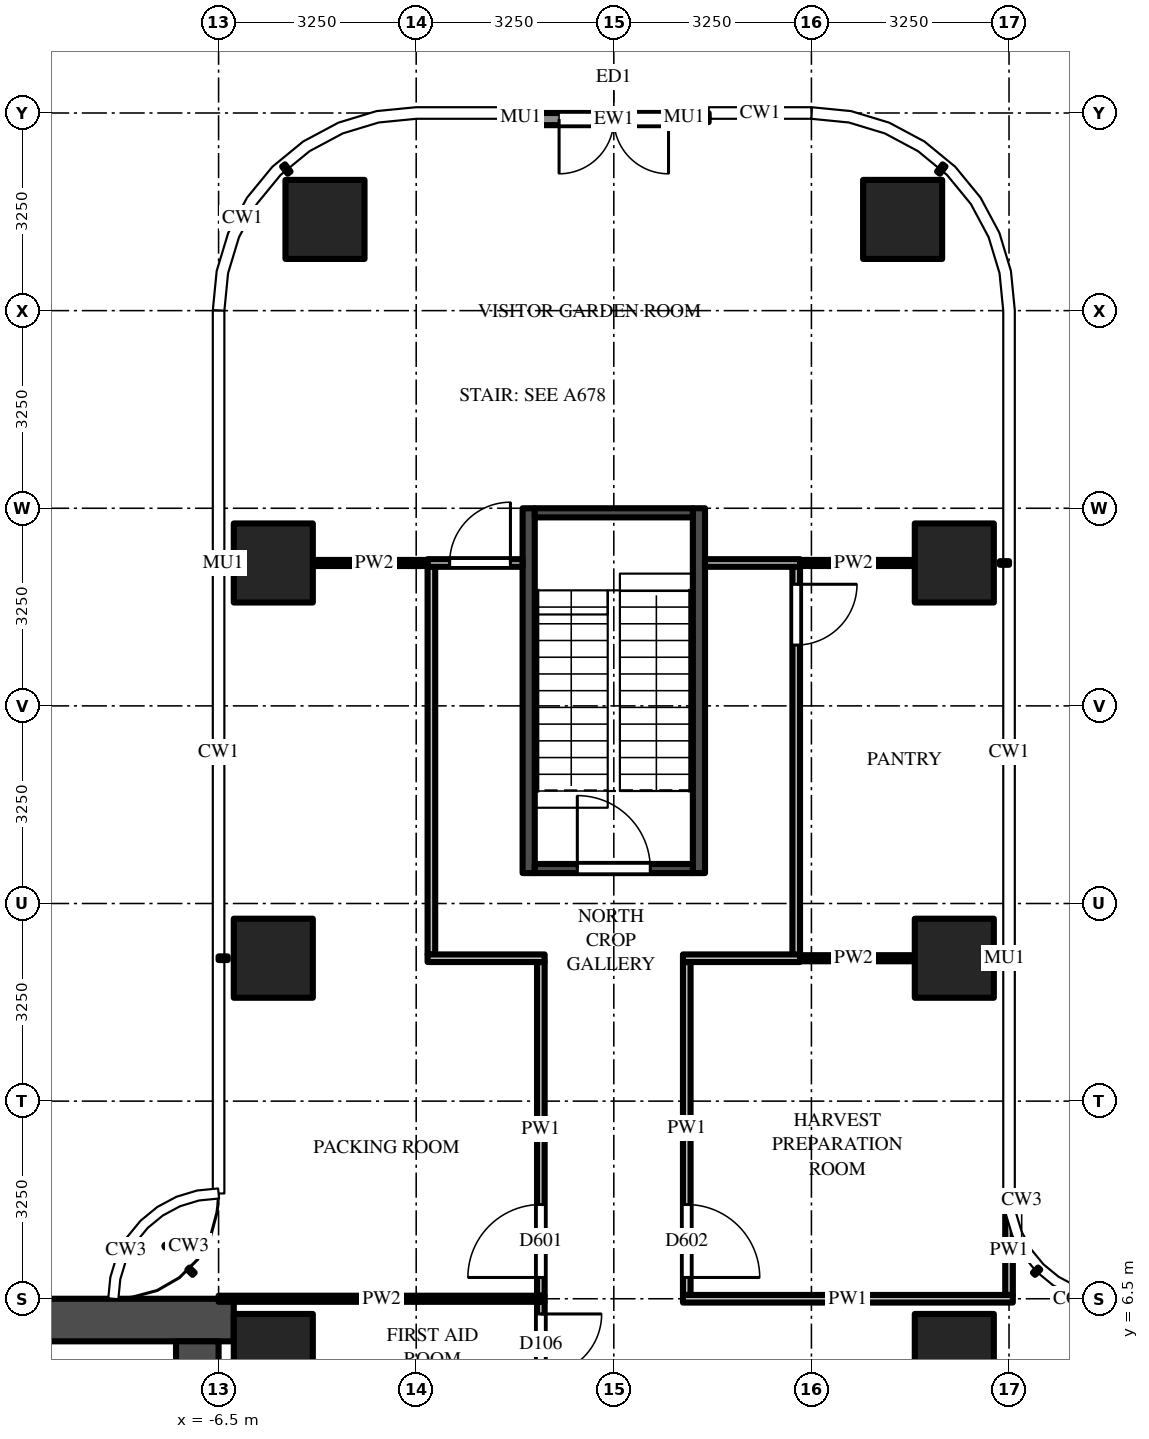
"""IFC4 building model, lengths in metres.
Left out: names, types, materials, properties, quantities, classifications, styles, units other than length and angle.
Written with IfcOpenShell. Run it as: python <this file> out.ifc"""

import sys

from ifc_helpers import new_model, si_unit, direction, frame, frame_2d, origin, origin_2d, place, context, subcontext, project, spatial, rectangle, extrude, source, transform, mapped, element, fill, save


model = new_model("IFC4")
c1 = context("Model", 3, precision=1e-05, world=origin(), true_north=direction((0.0, 1.0)))
c2 = subcontext(c1, "Body", "Model", "MODEL_VIEW")
j1 = project(units=[si_unit("LENGTHUNIT", "METRE"), si_unit("PLANEANGLEUNIT", "RADIAN")], contexts=[c1])
p1 = place(None, origin())
s1 = spatial("IfcSite", under=j1, at=p1, CompositionType="ELEMENT")
p2 = place(p1, origin())
s2 = spatial("IfcBuilding", under=s1, at=p2, CompositionType="ELEMENT")
p3 = place(p2, frame((0.0, 0.0, 111.0)))
s3 = spatial("IfcBuildingStorey", under=s2, at=p3, CompositionType="ELEMENT", Elevation=111.0)
m1 = source(origin(), c2, "Body", "SweptSolid", [
    extrude(rectangle(XDim=1.3, YDim=1.3, at=origin_2d()), origin(), (0.0, 0.0, 1.0), 4.5),
])
for number, where, z_axis, x_axis in (
    (1, (-5.6, 12.1, 0.0), (0.0, 0.0, 1.0), (1.0, 0.0, 0.0)),
    (2, (-5.6, 18.6, 0.0), (0.0, 0.0, 1.0), (1.0, 0.0, 0.0)),
    (3, (-4.75, 24.25, 0.0), (0.0, 0.0, 1.0), (1.0, 0.0, 0.0)),
    (4, (5.6, 12.1, 0.0), (0.0, 0.0, 1.0), (1.0, 0.0, 0.0)),
    (5, (5.6, 18.6, 0.0), (0.0, 0.0, 1.0), (1.0, 0.0, 0.0)),
    (6, (4.75, 24.25, 0.0), (0.0, 0.0, 1.0), (1.0, 0.0, 0.0)),
    (7, (5.6, 5.6, 0.0), (0.0, 0.0, 1.0), (1.0, 0.0, 0.0)),
    (8, (-5.6, 5.6, 0.0), (0.0, 0.0, 1.0), (1.0, 0.0, 0.0)),
):
    element("IfcColumn", number, at=place(p3, frame(where, z_axis=z_axis, x_axis=x_axis)), inside=s3, PredefinedType="COLUMN", context=c2, shape_type="MappedRepresentation", body=[
        mapped(m1, transform((0.0, 0.0, 0.0))),
    ])
m2 = source(origin(), c2, "Body", "SweptSolid", [
    extrude(rectangle(XDim=16.5, YDim=0.7, at=frame_2d((8.25, 0.0))), origin(), (0.0, 0.0, 1.0), 4.25),
])
p4 = place(p3, frame((-6.25, 6.15, 0.0), z_axis=(0.0, 0.0, 1.0), x_axis=(-1.0, 0.0, 0.0)))
e9 = element("IfcWall", 9, at=p4, inside=s3, PredefinedType="SHEAR", context=c2, shape_type="MappedRepresentation", body=[
    mapped(m2, transform((0.0, 0.0, 0.0))),
])
m3 = source(origin(), c2, "Body", "SweptSolid", [
    extrude(rectangle(XDim=9.05, YDim=0.7, at=frame_2d((4.525, 0.0))), origin(), (0.0, 0.0, 1.0), 4.25),
])
p5 = place(p3, frame((-6.85, 5.8, 0.0), z_axis=(0.0, 0.0, 1.0), x_axis=(0.0, -1.0, 0.0)))
e10 = element("IfcWall", 10, at=p5, inside=s3, PredefinedType="SHEAR", context=c2, shape_type="MappedRepresentation", body=[
    mapped(m3, transform((0.0, 0.0, 0.0))),
])
m4 = source(origin(), c2, "Body", "SweptSolid", [
    extrude(rectangle(XDim=1.8, YDim=2.1, at=frame_2d((0.9, 1.05))), frame((0.0, 0.36, 0.0), z_axis=(0.0, -1.0, 0.0), x_axis=(1.0, 0.0, 0.0)), (0.0, 0.0, 1.0), 0.72),
])
p6 = place(p5, frame((3.15, 0.0, 0.0)))
e11 = element("IfcOpeningElement", 11, at=p6, cuts=e10, PredefinedType="OPENING", context=c2, shape_type="MappedRepresentation", body=[
    mapped(m4, transform((0.0, 0.0, 0.0))),
])
m5 = source(origin(), c2, "Body", "SweptSolid", [
    extrude(rectangle(XDim=6.0, YDim=0.2, at=frame_2d((3.0, 0.0))), origin(), (0.0, 0.0, 1.0), 4.25),
])
for number, where, z_axis, x_axis in (
    (12, (-1.4, 13.5, 0.0), (0.0, 0.0, 1.0), (0.0, 1.0, 0.0)),
    (13, (1.4, 13.5, 0.0), (0.0, 0.0, 1.0), (0.0, 1.0, 0.0)),
):
    element("IfcWall", number, at=place(p3, frame(where, z_axis=z_axis, x_axis=x_axis)), inside=s3, PredefinedType="SHEAR", context=c2, shape_type="MappedRepresentation", body=[
        mapped(m5, transform((0.0, 0.0, 0.0))),
    ])
m6 = source(origin(), c2, "Body", "SweptSolid", [
    extrude(rectangle(XDim=2.6, YDim=0.15, at=frame_2d((1.3, 0.0))), origin(), (0.0, 0.0, 1.0), 4.25),
])
p7 = place(p3, frame((-1.3, 13.575, 0.0), z_axis=(0.0, 0.0, 1.0), x_axis=(1.0, 0.0, 0.0)))
e14 = element("IfcWall", 14, at=p7, inside=s3, PredefinedType="SHEAR", context=c2, shape_type="MappedRepresentation", body=[
    mapped(m6, transform((0.0, 0.0, 0.0))),
])
m7 = source(origin(), c2, "Body", "SweptSolid", [
    extrude(rectangle(XDim=1.2, YDim=2.1, at=frame_2d((0.6, 1.05))), frame((0.0, 0.085, 0.0), z_axis=(0.0, -1.0, 0.0), x_axis=(1.0, 0.0, 0.0)), (0.0, 0.0, 1.0), 0.17),
])
p8 = place(p7, frame((0.7, 0.0, 0.0)))
e15 = element("IfcOpeningElement", 15, at=p8, cuts=e14, PredefinedType="OPENING", context=c2, shape_type="MappedRepresentation", body=[
    mapped(m7, transform((0.0, 0.0, 0.0))),
])
p9 = place(p3, frame((-1.3, 19.425, 0.0), z_axis=(0.0, 0.0, 1.0), x_axis=(1.0, 0.0, 0.0)))
e16 = element("IfcWall", 16, at=p9, inside=s3, PredefinedType="SHEAR", context=c2, shape_type="MappedRepresentation", body=[
    mapped(m6, transform((0.0, 0.0, 0.0))),
])
m8 = source(origin(), c2, "Body", "SweptSolid", [
    extrude(rectangle(XDim=3.0, YDim=0.2, at=frame_2d((1.5, 0.0))), origin(), (0.0, 0.0, 1.0), 4.25),
])
p10 = place(p3, frame((1.5, 25.9, 0.0), z_axis=(0.0, 0.0, 1.0), x_axis=(-1.0, 0.0, 0.0)))
e17 = element("IfcWall", 17, at=p10, inside=s3, PredefinedType="SOLIDWALL", context=c2, shape_type="MappedRepresentation", body=[
    mapped(m8, transform((0.0, 0.0, 0.0))),
])
m9 = source(origin(), c2, "Body", "SweptSolid", [
    extrude(rectangle(XDim=1.8, YDim=2.4, at=frame_2d((0.9, 1.2))), frame((0.0, 0.11, 0.0), z_axis=(0.0, -1.0, 0.0), x_axis=(1.0, 0.0, 0.0)), (0.0, 0.0, 1.0), 0.22),
])
p11 = place(p10, frame((0.6, 0.0, 0.0)))
e18 = element("IfcOpeningElement", 18, at=p11, cuts=e17, PredefinedType="OPENING", context=c2, shape_type="MappedRepresentation", body=[
    mapped(m9, transform((0.0, 0.0, 0.0))),
])
m10 = source(origin(), c2, "Body", "SweptSolid", [
    extrude(rectangle(XDim=6.387, YDim=0.125, at=frame_2d((3.194, 0.0))), origin(), (0.0, 0.0, 1.0), 3.468),
])
p12 = place(p3, frame((-3.0, 12.163, 0.0), z_axis=(0.0, 0.0, 1.0), x_axis=(0.0, 1.0, 0.0)))
e19 = element("IfcWall", 19, at=p12, inside=s3, PredefinedType="PARTITIONING", context=c2, shape_type="MappedRepresentation", body=[
    mapped(m10, transform((0.0, 0.0, 0.0))),
])
m11 = source(origin(), c2, "Body", "SweptSolid", [
    extrude(rectangle(XDim=3.137, YDim=0.125, at=frame_2d((1.569, 0.0))), origin(), (0.0, 0.0, 1.0), 3.468),
])
p13 = place(p3, frame((-1.2, 6.45, 0.0), z_axis=(0.0, 0.0, 1.0), x_axis=(0.0, -1.0, 0.0)))
e20 = element("IfcWall", 20, at=p13, inside=s3, PredefinedType="PARTITIONING", context=c2, shape_type="MappedRepresentation", body=[
    mapped(m11, transform((0.0, 0.0, 0.0))),
])
m12 = source(origin(), c2, "Body", "SweptSolid", [
    extrude(rectangle(XDim=1.0, YDim=2.1, at=frame_2d((0.5, 1.05))), frame((0.0, 0.073, 0.0), z_axis=(0.0, -1.0, 0.0), x_axis=(1.0, 0.0, 0.0)), (0.0, 0.0, 1.0), 0.145),
])
p14 = place(p13, frame((0.2, 0.0, 0.0)))
e21 = element("IfcOpeningElement", 21, at=p14, cuts=e20, PredefinedType="OPENING", context=c2, shape_type="MappedRepresentation", body=[
    mapped(m12, transform((0.0, 0.0, 0.0))),
])
m13 = source(origin(), c2, "Body", "SweptSolid", [
    extrude(rectangle(XDim=5.488, YDim=0.125, at=frame_2d((2.744, 0.0))), origin(), (0.0, 0.0, 1.0), 3.468),
])
p15 = place(p3, frame((-1.2, 6.55, 0.0), z_axis=(0.0, 0.0, 1.0), x_axis=(0.0, 1.0, 0.0)))
e22 = element("IfcWall", 22, at=p15, inside=s3, PredefinedType="PARTITIONING", context=c2, shape_type="MappedRepresentation", body=[
    mapped(m13, transform((0.0, 0.0, 0.0))),
])
m14 = source(origin(), c2, "Body", "SweptSolid", [
    extrude(rectangle(XDim=1.2, YDim=2.1, at=frame_2d((0.6, 1.05))), frame((0.0, 0.073, 0.0), z_axis=(0.0, -1.0, 0.0), x_axis=(1.0, 0.0, 0.0)), (0.0, 0.0, 1.0), 0.145),
])
p16 = place(p15, frame((0.3, 0.0, 0.0)))
e23 = element("IfcOpeningElement", 23, at=p16, cuts=e22, PredefinedType="OPENING", context=c2, shape_type="MappedRepresentation", body=[
    mapped(m14, transform((0.0, 0.0, 0.0))),
])
m15 = source(origin(), c2, "Body", "SweptSolid", [
    extrude(rectangle(XDim=5.475, YDim=0.125, at=frame_2d((2.738, 0.0))), origin(), (0.0, 0.0, 1.0), 3.468),
])
p17 = place(p3, frame((1.2, 12.038, 0.0), z_axis=(0.0, 0.0, 1.0), x_axis=(0.0, -1.0, 0.0)))
e24 = element("IfcWall", 24, at=p17, inside=s3, PredefinedType="PARTITIONING", context=c2, shape_type="MappedRepresentation", body=[
    mapped(m15, transform((0.0, 0.0, 0.0))),
])
p18 = place(p17, frame((3.988, 0.0, 0.0)))
e25 = element("IfcOpeningElement", 25, at=p18, cuts=e24, PredefinedType="OPENING", context=c2, shape_type="MappedRepresentation", body=[
    mapped(m14, transform((0.0, 0.0, 0.0))),
])
m16 = source(origin(), c2, "Body", "SweptSolid", [
    extrude(rectangle(XDim=6.4, YDim=0.125, at=frame_2d((3.2, 0.0))), origin(), (0.0, 0.0, 1.0), 3.468),
])
p19 = place(p3, frame((3.0, 18.55, 0.0), z_axis=(0.0, 0.0, 1.0), x_axis=(0.0, -1.0, 0.0)))
e26 = element("IfcWall", 26, at=p19, inside=s3, PredefinedType="PARTITIONING", context=c2, shape_type="MappedRepresentation", body=[
    mapped(m16, transform((0.0, 0.0, 0.0))),
])
p20 = place(p19, frame((0.3, 0.0, 0.0)))
e27 = element("IfcOpeningElement", 27, at=p20, cuts=e26, PredefinedType="OPENING", context=c2, shape_type="MappedRepresentation", body=[
    mapped(m12, transform((0.0, 0.0, 0.0))),
])
m17 = source(origin(), c2, "Body", "SweptSolid", [
    extrude(rectangle(XDim=1.469, YDim=0.125, at=frame_2d((0.734, 0.0))), origin(), (0.0, 0.0, 1.0), 4.25),
])
p21 = place(p3, frame((6.5, 6.562, 0.0), z_axis=(0.0, 0.0, 1.0), x_axis=(0.0, 1.0, 0.0)))
e28 = element("IfcWall", 28, at=p21, inside=s3, PredefinedType="PARTITIONING", context=c2, shape_type="MappedRepresentation", body=[
    mapped(m17, transform((0.0, 0.0, 0.0))),
])
m18 = source(origin(), c2, "Body", "SweptSolid", [
    extrude(rectangle(XDim=5.363, YDim=0.1, at=frame_2d((2.681, 0.0))), origin(), (0.0, 0.0, 1.0), 3.33),
])
p22 = place(p3, frame((-6.5, 6.5, 0.0), z_axis=(0.0, 0.0, 1.0), x_axis=(1.0, 0.0, 0.0)))
e29 = element("IfcWall", 29, at=p22, inside=s3, PredefinedType="PARTITIONING", context=c2, shape_type="MappedRepresentation", body=[
    mapped(m18, transform((0.0, 0.0, 0.0))),
])
m19 = source(origin(), c2, "Body", "SweptSolid", [
    extrude(rectangle(XDim=5.425, YDim=0.125, at=frame_2d((2.712, 0.0))), origin(), (0.0, 0.0, 1.0), 3.33),
])
p23 = place(p3, frame((1.137, 6.5, 0.0), z_axis=(0.0, 0.0, 1.0), x_axis=(1.0, 0.0, 0.0)))
e30 = element("IfcWall", 30, at=p23, inside=s3, PredefinedType="PARTITIONING", context=c2, shape_type="MappedRepresentation", body=[
    mapped(m19, transform((0.0, 0.0, 0.0))),
])
m20 = source(origin(), c2, "Body", "SweptSolid", [
    extrude(rectangle(XDim=2.012, YDim=0.1, at=frame_2d((1.006, 0.0))), origin(), (0.0, 0.0, 1.0), 3.468),
])
p24 = place(p3, frame((2.938, 12.1, 0.0), z_axis=(0.0, 0.0, 1.0), x_axis=(1.0, 0.0, 0.0)))
e31 = element("IfcWall", 31, at=p24, inside=s3, PredefinedType="PARTITIONING", context=c2, shape_type="MappedRepresentation", body=[
    mapped(m20, transform((0.0, 0.0, 0.0))),
])
m21 = source(origin(), c2, "Body", "SweptSolid", [
    extrude(rectangle(XDim=1.925, YDim=0.125, at=frame_2d((0.962, 0.0))), origin(), (0.0, 0.0, 1.0), 3.468),
])
for number, where, z_axis, x_axis in (
    (32, (-1.137, 12.1, 0.0), (0.0, 0.0, 1.0), (-1.0, 0.0, 0.0)),
    (33, (3.062, 12.1, 0.0), (0.0, 0.0, 1.0), (-1.0, 0.0, 0.0)),
):
    element("IfcWall", number, at=place(p3, frame(where, z_axis=z_axis, x_axis=x_axis)), inside=s3, PredefinedType="PARTITIONING", context=c2, shape_type="MappedRepresentation", body=[
        mapped(m21, transform((0.0, 0.0, 0.0))),
    ])
m22 = source(origin(), c2, "Body", "SweptSolid", [
    extrude(rectangle(XDim=2.012, YDim=0.1, at=frame_2d((1.006, 0.0))), origin(), (0.0, 0.0, 1.0), 3.697),
])
for number, where, z_axis, x_axis in (
    (34, (-4.95, 18.6, 0.0), (0.0, 0.0, 1.0), (1.0, 0.0, 0.0)),
    (35, (2.938, 18.6, 0.0), (0.0, 0.0, 1.0), (1.0, 0.0, 0.0)),
):
    element("IfcWall", number, at=place(p3, frame(where, z_axis=z_axis, x_axis=x_axis)), inside=s3, PredefinedType="PARTITIONING", context=c2, shape_type="MappedRepresentation", body=[
        mapped(m22, transform((0.0, 0.0, 0.0))),
    ])
m23 = source(origin(), c2, "Body", "SweptSolid", [
    extrude(rectangle(XDim=1.562, YDim=0.125, at=frame_2d((0.781, 0.0))), origin(), (0.0, 0.0, 1.0), 3.697),
])
p25 = place(p3, frame((-3.062, 18.6, 0.0), z_axis=(0.0, 0.0, 1.0), x_axis=(1.0, 0.0, 0.0)))
e36 = element("IfcWall", 36, at=p25, inside=s3, PredefinedType="PARTITIONING", context=c2, shape_type="MappedRepresentation", body=[
    mapped(m23, transform((0.0, 0.0, 0.0))),
])
p26 = place(p25, frame((0.363, 0.0, 0.0)))
e37 = element("IfcOpeningElement", 37, at=p26, cuts=e36, PredefinedType="OPENING", context=c2, shape_type="MappedRepresentation", body=[
    mapped(m12, transform((0.0, 0.0, 0.0))),
])
p27 = place(p3, frame((1.5, 18.6, 0.0), z_axis=(0.0, 0.0, 1.0), x_axis=(1.0, 0.0, 0.0)))
e38 = element("IfcWall", 38, at=p27, inside=s3, PredefinedType="PARTITIONING", context=c2, shape_type="MappedRepresentation", body=[
    mapped(m23, transform((0.0, 0.0, 0.0))),
])
m24 = source(origin(), c2, "Body", "SweptSolid", [
    extrude(rectangle(XDim=1.2, YDim=2.1, at=frame_2d((0.6, 1.05))), frame((0.0, 0.025, 0.0), z_axis=(0.0, -1.0, 0.0), x_axis=(1.0, 0.0, 0.0)), (0.0, 0.0, 1.0), 0.05),
])
p28 = place(p8, origin())
e39 = element("IfcDoor", 39, at=p28, inside=s3, OperationType="SINGLE_SWING_LEFT", PredefinedType="DOOR", context=c2, shape_type="MappedRepresentation", body=[
    mapped(m24, transform((0.0, 0.0, 0.0))),
])
fill(e15, e39)
m25 = source(origin(), c2, "Body", "SweptSolid", [
    extrude(rectangle(XDim=1.8, YDim=2.4, at=frame_2d((0.9, 1.2))), frame((0.0, 0.025, 0.0), z_axis=(0.0, -1.0, 0.0), x_axis=(1.0, 0.0, 0.0)), (0.0, 0.0, 1.0), 0.05),
])
p29 = place(p11, origin())
e40 = element("IfcDoor", 40, at=p29, inside=s3, OperationType="DOUBLE_DOOR_SINGLE_SWING", PredefinedType="DOOR", context=c2, shape_type="MappedRepresentation", body=[
    mapped(m25, transform((0.0, 0.0, 0.0))),
])
fill(e18, e40)
m26 = source(origin(), c2, "Body", "SweptSolid", [
    extrude(rectangle(XDim=1.0, YDim=2.1, at=frame_2d((0.5, 1.05))), frame((0.0, 0.025, 0.0), z_axis=(0.0, -1.0, 0.0), x_axis=(1.0, 0.0, 0.0)), (0.0, 0.0, 1.0), 0.05),
])
p30 = place(p14, origin())
e41 = element("IfcDoor", 41, at=p30, inside=s3, OperationType="SINGLE_SWING_LEFT", PredefinedType="DOOR", context=c2, shape_type="MappedRepresentation", body=[
    mapped(m26, transform((0.0, 0.0, 0.0))),
])
fill(e21, e41)
p31 = place(p16, origin())
e42 = element("IfcDoor", 42, at=p31, inside=s3, OperationType="SINGLE_SWING_LEFT", PredefinedType="DOOR", context=c2, shape_type="MappedRepresentation", body=[
    mapped(m24, transform((0.0, 0.0, 0.0))),
])
fill(e23, e42)
p32 = place(p18, origin())
e43 = element("IfcDoor", 43, at=p32, inside=s3, OperationType="SINGLE_SWING_RIGHT", PredefinedType="DOOR", context=c2, shape_type="MappedRepresentation", body=[
    mapped(m24, transform((0.0, 0.0, 0.0))),
])
fill(e25, e43)
p33 = place(p20, origin())
e44 = element("IfcDoor", 44, at=p33, inside=s3, OperationType="SINGLE_SWING_LEFT", PredefinedType="DOOR", context=c2, shape_type="MappedRepresentation", body=[
    mapped(m26, transform((0.0, 0.0, 0.0))),
])
fill(e27, e44)
p34 = place(p26, origin())
e45 = element("IfcDoor", 45, at=p34, inside=s3, OperationType="SINGLE_SWING_RIGHT", PredefinedType="DOOR", context=c2, shape_type="MappedRepresentation", body=[
    mapped(m26, transform((0.0, 0.0, 0.0))),
])
fill(e37, e45)
save(model, sys.argv[1])
